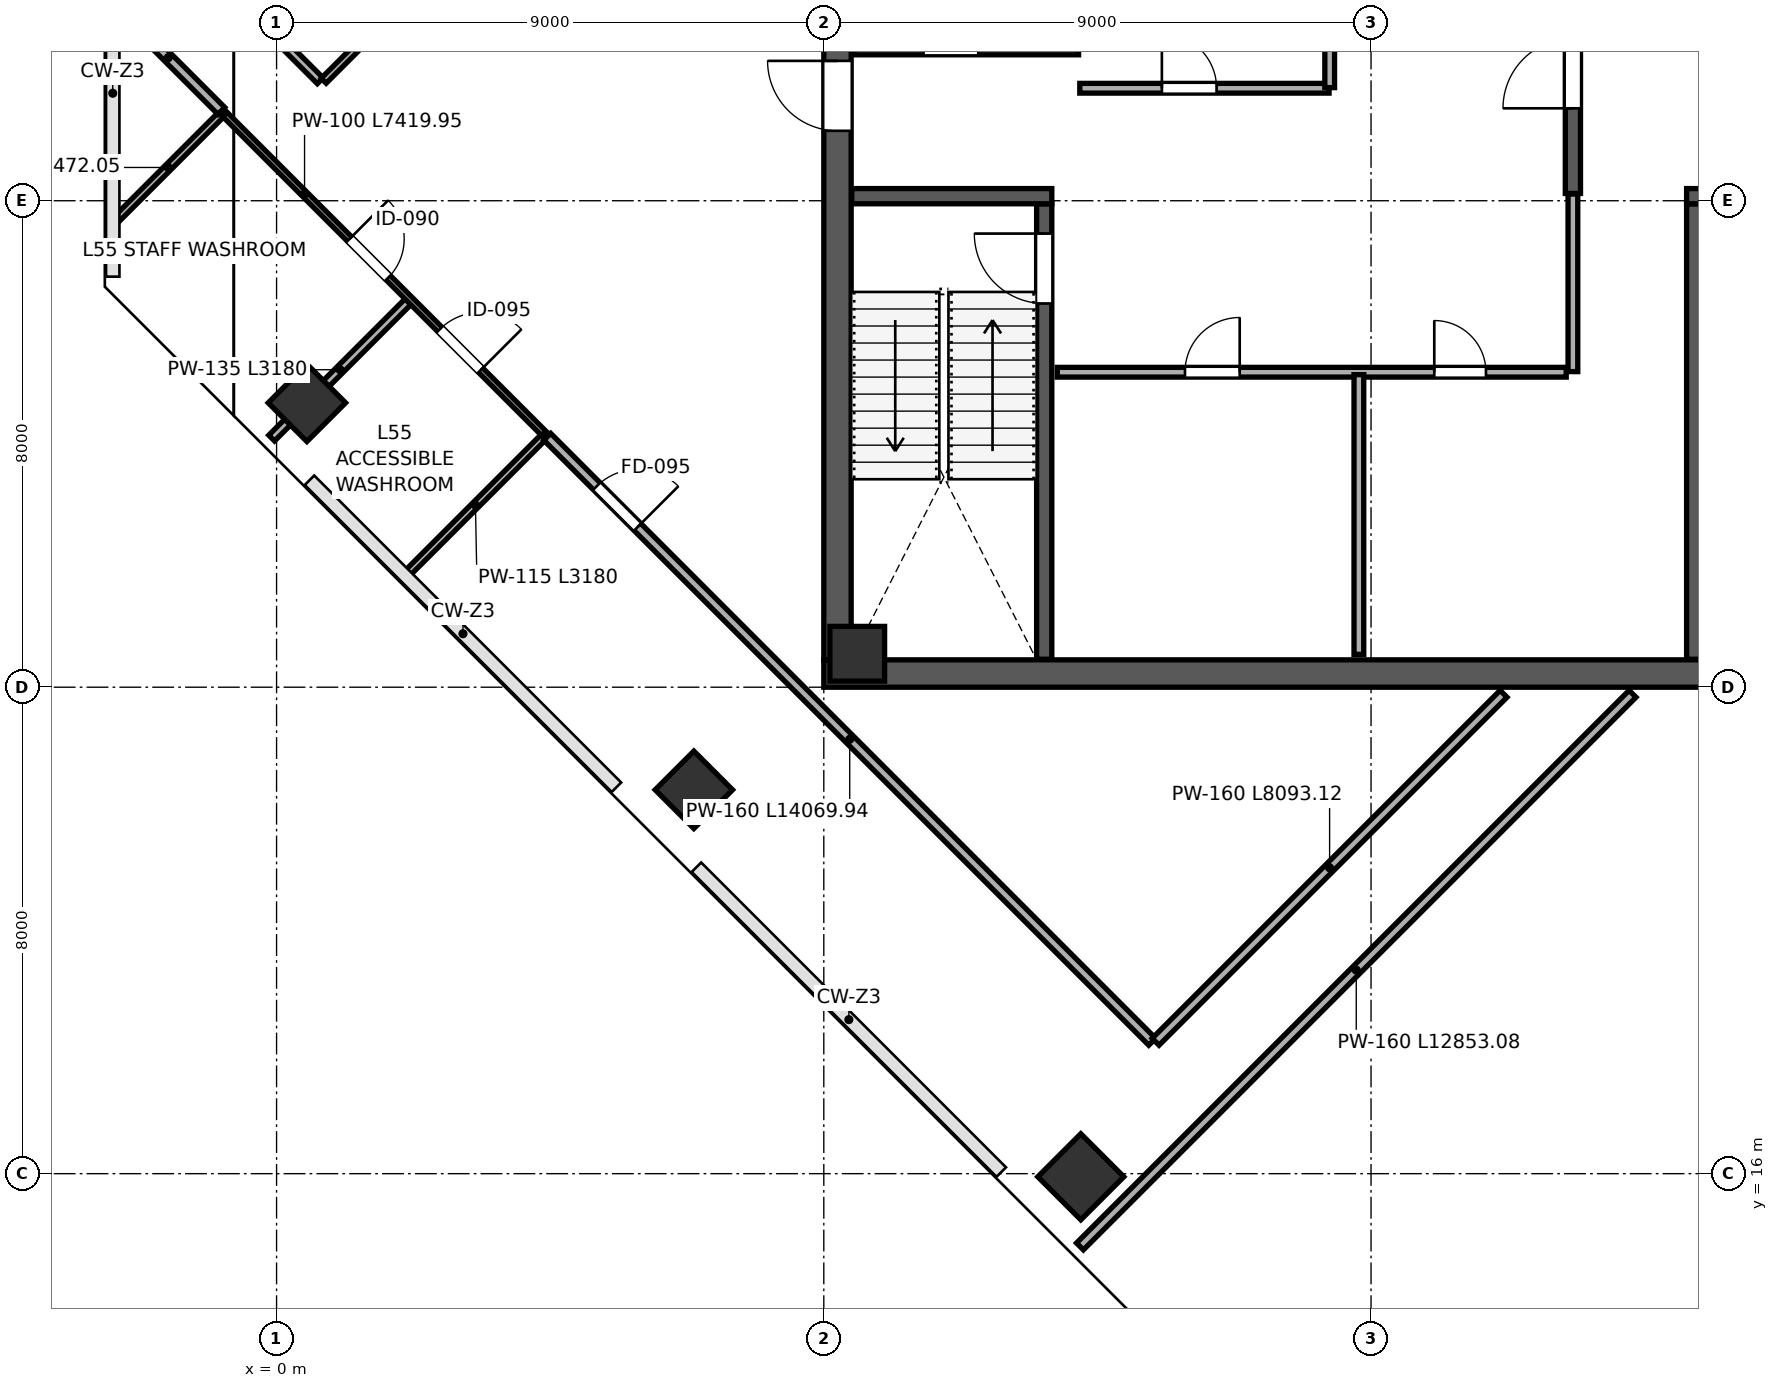
"""IFC4 building model, lengths in metres.
Left out: names, types, materials, properties, quantities, classifications, styles, units other than length and angle.
Written with IfcOpenShell. Run it as: python <this file> out.ifc"""

import sys

from ifc_helpers import new_model, si_unit, direction, frame, frame_2d, origin, origin_2d, place, context, subcontext, project, spatial, rectangle, extrude, source, transform, mapped, element, fill, save


model = new_model("IFC4")
c1 = context("Model", 3, precision=1e-05, world=origin(), true_north=direction((0.0, 1.0)))
c2 = subcontext(c1, "Body", "Model", "MODEL_VIEW")
j1 = project(units=[si_unit("LENGTHUNIT", "METRE"), si_unit("PLANEANGLEUNIT", "RADIAN")], contexts=[c1])
p1 = place(None, origin())
s1 = spatial("IfcSite", under=j1, at=p1, CompositionType="ELEMENT")
p2 = place(p1, origin())
s2 = spatial("IfcBuilding", under=s1, at=p2, CompositionType="ELEMENT")
p3 = place(p2, frame((0.0, 0.0, 245.8)))
s3 = spatial("IfcBuildingStorey", under=s2, at=p3, CompositionType="ELEMENT", Elevation=245.8)
m1 = source(origin(), c2, "Body", "SweptSolid", [
    extrude(rectangle(XDim=0.9, YDim=0.9, at=origin_2d()), origin(), (0.0, 0.0, 1.0), 4.198),
])
p4 = place(p3, frame((9.55, 24.55, 0.001), z_axis=(0.0, 0.0, 1.0), x_axis=(1.0, 0.0, 0.0)))
e1 = element("IfcColumn", 1, at=p4, inside=s3, PredefinedType="COLUMN", context=c2, shape_type="MappedRepresentation", body=[
    mapped(m1, transform((0.0, 0.0, 0.0), scale=1.0)),
])
m2 = source(origin(), c2, "Body", "SweptSolid", [
    extrude(rectangle(XDim=0.9, YDim=0.9, at=origin_2d()), origin(), (0.0, 0.0, 1.0), 4.198),
])
for number, where, z_axis, x_axis in (
    (2, (0.499, 28.677, 0.001), (0.0, 0.0, 1.0), (-0.707, 0.707, 0.0)),
    (3, (6.863, 22.312, 0.001), (0.0, 0.0, 1.0), (-0.707, 0.707, 0.0)),
):
    element("IfcColumn", number, at=place(p3, frame(where, z_axis=z_axis, x_axis=x_axis)), inside=s3, PredefinedType="COLUMN", context=c2, shape_type="MappedRepresentation", body=[
        mapped(m2, transform((0.0, 0.0, 0.0), scale=1.0)),
    ])
m3 = source(origin(), c2, "Body", "SweptSolid", [
    extrude(rectangle(XDim=1.0, YDim=1.0, at=origin_2d()), origin(), (0.0, 0.0, 1.0), 4.198),
])
p5 = place(p3, frame((13.227, 15.949, 0.001), z_axis=(0.0, 0.0, 1.0), x_axis=(-0.707106781187, 0.707106781187, 0.0)))
e4 = element("IfcColumn", 4, at=p5, inside=s3, PredefinedType="COLUMN", context=c2, shape_type="MappedRepresentation", body=[
    mapped(m3, transform((0.0, 0.0, 0.0), scale=1.0)),
])
p6 = place(p3, frame((9.225, 24.45, 0.0), z_axis=(0.0, 0.0, 1.0), x_axis=(0.0, 1.0, 0.0)))
e5 = element("IfcWall", 5, at=p6, inside=s3, PredefinedType="SHEAR", context=c2, shape_type="SweptSolid", body=[
    extrude(rectangle(XDim=15.1, YDim=0.45, at=frame_2d((7.55, 0.0))), origin(), (0.0, 0.0, 1.0), 3.96),
])
p7 = place(p6, frame((8.7, 0.0, 0.0)))
e6 = element("IfcOpeningElement", 6, at=p7, cuts=e5, PredefinedType="OPENING", context=c2, shape_type="SweptSolid", body=[
    extrude(rectangle(XDim=1.15, YDim=2.2, at=frame_2d((0.575, 1.1))), frame((0.0, 0.235, 0.0), z_axis=(0.0, -1.0, 0.0), x_axis=(1.0, 0.0, 0.0)), (0.0, 0.0, 1.0), 0.47),
])
p8 = place(p3, frame((9.0, 24.225, 0.0), z_axis=(0.0, 0.0, 1.0), x_axis=(1.0, 0.0, 0.0)))
e7 = element("IfcWall", 7, at=p8, inside=s3, PredefinedType="SHEAR", context=c2, shape_type="SweptSolid", body=[
    extrude(rectangle(XDim=18.0, YDim=0.45, at=frame_2d((9.0, 0.0))), origin(), (0.0, 0.0, 1.0), 3.96),
])
p9 = place(p3, frame((12.625, 24.46, 0.0), z_axis=(0.0, 0.0, 1.0), x_axis=(0.0, 1.0, 0.0)))
e8 = element("IfcWall", 8, at=p9, inside=s3, PredefinedType="SHEAR", context=c2, shape_type="SweptSolid", body=[
    extrude(rectangle(XDim=7.49, YDim=0.25, at=frame_2d((3.745, 0.0))), origin(), (0.0, 0.0, 1.0), 3.96),
])
p10 = place(p9, frame((5.85, 0.0, 0.0)))
e9 = element("IfcOpeningElement", 9, at=p10, cuts=e8, PredefinedType="OPENING", context=c2, shape_type="SweptSolid", body=[
    extrude(rectangle(XDim=1.15, YDim=2.2, at=frame_2d((0.575, 1.1))), frame((0.0, 0.135, 0.0), z_axis=(0.0, -1.0, 0.0), x_axis=(1.0, 0.0, 0.0)), (0.0, 0.0, 1.0), 0.27),
])
p11 = place(p3, frame((9.46, 32.075, 0.0), z_axis=(0.0, 0.0, 1.0), x_axis=(1.0, 0.0, 0.0)))
e10 = element("IfcWall", 10, at=p11, inside=s3, PredefinedType="SHEAR", context=c2, shape_type="SweptSolid", body=[
    extrude(rectangle(XDim=3.29, YDim=0.25, at=frame_2d((1.645, 0.0))), origin(), (0.0, 0.0, 1.0), 3.96),
])
p12 = place(p3, frame((23.315, 24.46, 0.0), z_axis=(0.0, 0.0, 1.0), x_axis=(0.0, 1.0, 0.0)))
e11 = element("IfcWall", 11, at=p12, inside=s3, PredefinedType="SHEAR", context=c2, shape_type="SweptSolid", body=[
    extrude(rectangle(XDim=7.49, YDim=0.25, at=frame_2d((3.745, 0.0))), origin(), (0.0, 0.0, 1.0), 3.96),
])
p13 = place(p3, frame((23.19, 32.075, 0.0), z_axis=(0.0, 0.0, 1.0), x_axis=(1.0, 0.0, 0.0)))
e12 = element("IfcWall", 12, at=p13, inside=s3, PredefinedType="SHEAR", context=c2, shape_type="SweptSolid", body=[
    extrude(rectangle(XDim=3.35, YDim=0.25, at=frame_2d((1.675, 0.0))), origin(), (0.0, 0.0, 1.0), 3.96),
])
p14 = place(p13, frame((0.85, 0.0, 0.0)))
e13 = element("IfcOpeningElement", 13, at=p14, cuts=e12, PredefinedType="OPENING", context=c2, shape_type="SweptSolid", body=[
    extrude(rectangle(XDim=1.15, YDim=2.2, at=frame_2d((0.575, 1.1))), frame((0.0, 0.135, 0.0), z_axis=(0.0, -1.0, 0.0), x_axis=(1.0, 0.0, 0.0)), (0.0, 0.0, 1.0), 0.27),
])
p15 = place(p3, frame((21.32, 32.12, 0.0), z_axis=(0.0, 0.0, 1.0), x_axis=(0.0, 1.0, 0.0)))
e14 = element("IfcWall", 14, at=p15, inside=s3, PredefinedType="SHEAR", context=c2, shape_type="SweptSolid", body=[
    extrude(rectangle(XDim=7.42, YDim=0.25, at=frame_2d((3.71, 0.0))), origin(), (0.0, 0.0, 1.0), 3.96),
])
p16 = place(p15, frame((1.4, 0.0, 0.0)))
e15 = element("IfcOpeningElement", 15, at=p16, cuts=e14, PredefinedType="OPENING", context=c2, shape_type="SweptSolid", body=[
    extrude(rectangle(XDim=1.15, YDim=2.2, at=frame_2d((0.575, 1.1))), frame((0.0, 0.135, 0.0), z_axis=(0.0, -1.0, 0.0), x_axis=(1.0, 0.0, 0.0)), (0.0, 0.0, 1.0), 0.27),
])
p17 = place(p3, frame((9.49, 34.48, 0.0), z_axis=(0.0, 0.0, 1.0), x_axis=(1.0, 0.0, 0.0)))
e16 = element("IfcWall", 16, at=p17, inside=s3, PredefinedType="PARTITIONING", context=c2, shape_type="SweptSolid", body=[
    extrude(rectangle(XDim=3.7, YDim=0.16, at=frame_2d((1.85, 0.0))), origin(), (0.0, 0.0, 1.0), 3.96),
])
p18 = place(p17, frame((1.15, 0.0, 0.0)))
e17 = element("IfcOpeningElement", 17, at=p18, cuts=e16, PredefinedType="OPENING", context=c2, shape_type="SweptSolid", body=[
    extrude(rectangle(XDim=0.9, YDim=2.15, at=frame_2d((0.45, 1.075))), frame((0.0, 0.09, 0.0), z_axis=(0.0, -1.0, 0.0), x_axis=(1.0, 0.0, 0.0)), (0.0, 0.0, 1.0), 0.18),
])
p19 = place(p3, frame((13.21, 33.85, 0.0), z_axis=(0.0, 0.0, 1.0), x_axis=(1.0, 0.0, 0.0)))
e18 = element("IfcWall", 18, at=p19, inside=s3, PredefinedType="PARTITIONING", context=c2, shape_type="SweptSolid", body=[
    extrude(rectangle(XDim=4.1, YDim=0.16, at=frame_2d((2.05, 0.0))), origin(), (0.0, 0.0, 1.0), 3.96),
])
p20 = place(p19, frame((1.35, 0.0, 0.0)))
e19 = element("IfcOpeningElement", 19, at=p20, cuts=e18, PredefinedType="OPENING", context=c2, shape_type="SweptSolid", body=[
    extrude(rectangle(XDim=0.9, YDim=2.15, at=frame_2d((0.45, 1.075))), frame((0.0, 0.09, 0.0), z_axis=(0.0, -1.0, 0.0), x_axis=(1.0, 0.0, 0.0)), (0.0, 0.0, 1.0), 0.18),
])
p21 = place(p3, frame((17.32, 33.86, 0.0), z_axis=(0.0, 0.0, 1.0), x_axis=(0.0, 1.0, 0.0)))
e20 = element("IfcWall", 20, at=p21, inside=s3, PredefinedType="PARTITIONING", context=c2, shape_type="SweptSolid", body=[
    extrude(rectangle(XDim=1.93, YDim=0.16, at=frame_2d((0.965, 0.0))), origin(), (0.0, 0.0, 1.0), 3.96),
])
p22 = place(p3, frame((12.84, 29.18, 0.0), z_axis=(0.0, 0.0, 1.0), x_axis=(1.0, 0.0, 0.0)))
e21 = element("IfcWall", 21, at=p22, inside=s3, PredefinedType="PARTITIONING", context=c2, shape_type="SweptSolid", body=[
    extrude(rectangle(XDim=8.37, YDim=0.16, at=frame_2d((4.185, 0.0))), origin(), (0.0, 0.0, 1.0), 3.96),
])
p23 = place(p22, frame((2.1, 0.0, 0.0)))
e22 = element("IfcOpeningElement", 22, at=p23, cuts=e21, PredefinedType="OPENING", context=c2, shape_type="SweptSolid", body=[
    extrude(rectangle(XDim=0.9, YDim=2.15, at=frame_2d((0.45, 1.075))), frame((0.0, 0.09, 0.0), z_axis=(0.0, -1.0, 0.0), x_axis=(1.0, 0.0, 0.0)), (0.0, 0.0, 1.0), 0.18),
])
p24 = place(p22, frame((6.2, 0.0, 0.0)))
e23 = element("IfcOpeningElement", 23, at=p24, cuts=e21, PredefinedType="OPENING", context=c2, shape_type="SweptSolid", body=[
    extrude(rectangle(XDim=0.85, YDim=2.1, at=frame_2d((0.425, 1.05))), frame((0.0, 0.09, 0.0), z_axis=(0.0, -1.0, 0.0), x_axis=(1.0, 0.0, 0.0)), (0.0, 0.0, 1.0), 0.18),
])
p25 = place(p3, frame((17.8, 24.54, 0.0), z_axis=(0.0, 0.0, 1.0), x_axis=(0.0, 1.0, 0.0)))
e24 = element("IfcWall", 24, at=p25, inside=s3, PredefinedType="PARTITIONING", context=c2, shape_type="SweptSolid", body=[
    extrude(rectangle(XDim=4.6, YDim=0.16, at=frame_2d((2.3, 0.0))), origin(), (0.0, 0.0, 1.0), 3.96),
])
p26 = place(p3, frame((21.32, 29.19, 0.0), z_axis=(0.0, 0.0, 1.0), x_axis=(0.0, 1.0, 0.0)))
e25 = element("IfcWall", 25, at=p26, inside=s3, PredefinedType="PARTITIONING", context=c2, shape_type="SweptSolid", body=[
    extrude(rectangle(XDim=2.92, YDim=0.16, at=frame_2d((1.46, 0.0))), origin(), (0.0, 0.0, 1.0), 3.96),
])
p27 = place(p3, frame((-2.656, 31.673, 0.0), z_axis=(0.0, 0.0, 1.0), x_axis=(0.707106781187, 0.707106781187, 0.0)))
e26 = element("IfcWall", 26, at=p27, inside=s3, PredefinedType="PARTITIONING", context=c2, shape_type="SweptSolid", body=[
    extrude(rectangle(XDim=2.472, YDim=0.115, at=frame_2d((1.236, 0.0))), origin(), (0.0, 0.0, 1.0), 3.96),
])
p28 = place(p3, frame((-2.656, 35.226, 0.0), z_axis=(0.0, 0.0, 1.0), x_axis=(0.707106781187, -0.707106781187, 0.0)))
e27 = element("IfcWall", 27, at=p28, inside=s3, PredefinedType="PARTITIONING", context=c2, shape_type="SweptSolid", body=[
    extrude(rectangle(XDim=2.472, YDim=0.16, at=frame_2d((1.236, 0.0))), origin(), (0.0, 0.0, 1.0), 3.96),
])
p29 = place(p3, frame((-0.081, 28.097, 0.0), z_axis=(0.0, 0.0, 1.0), x_axis=(0.707068394238, 0.707145166051, 0.0)))
e28 = element("IfcWall", 28, at=p29, inside=s3, PredefinedType="PARTITIONING", context=c2, shape_type="SweptSolid", body=[
    extrude(rectangle(XDim=3.18, YDim=0.135, at=frame_2d((1.59, 0.0))), origin(), (0.0, 0.0, 1.0), 3.195),
])
p30 = place(p3, frame((2.146, 25.869, 0.0), z_axis=(0.0, 0.0, 1.0), x_axis=(0.707106781187, 0.707106781187, 0.0)))
e29 = element("IfcWall", 29, at=p30, inside=s3, PredefinedType="PARTITIONING", context=c2, shape_type="SweptSolid", body=[
    extrude(rectangle(XDim=3.18, YDim=0.115, at=frame_2d((1.59, 0.0))), origin(), (0.0, 0.0, 1.0), 3.195),
])
p31 = place(p3, frame((-0.852, 33.421, 0.0), z_axis=(0.0, 0.0, 1.0), x_axis=(0.707090329382, -0.707123232608, 0.0)))
e30 = element("IfcWall", 30, at=p31, inside=s3, PredefinedType="PARTITIONING", context=c2, shape_type="SweptSolid", body=[
    extrude(rectangle(XDim=7.42, YDim=0.1, at=frame_2d((3.71, 0.0))), origin(), (0.0, 0.0, 1.0), 3.96),
])
p32 = place(p31, frame((2.9, 0.0, 0.0)))
e31 = element("IfcOpeningElement", 31, at=p32, cuts=e30, PredefinedType="OPENING", context=c2, shape_type="SweptSolid", body=[
    extrude(rectangle(XDim=0.9, YDim=2.15, at=frame_2d((0.45, 1.075))), frame((0.0, 0.06, 0.0), z_axis=(0.0, -1.0, 0.0), x_axis=(1.0, 0.0, 0.0)), (0.0, 0.0, 1.0), 0.12),
])
p33 = place(p31, frame((5.0, 0.0, 0.0)))
e32 = element("IfcOpeningElement", 32, at=p33, cuts=e30, PredefinedType="OPENING", context=c2, shape_type="SweptSolid", body=[
    extrude(rectangle(XDim=0.95, YDim=2.15, at=frame_2d((0.475, 1.075))), frame((0.0, 0.06, 0.0), z_axis=(0.0, -1.0, 0.0), x_axis=(1.0, 0.0, 0.0)), (0.0, 0.0, 1.0), 0.12),
])
p34 = place(p3, frame((4.452, 28.118, 0.0), z_axis=(0.0, 0.0, 1.0), x_axis=(0.707106781187, -0.707106781187, 0.0)))
e33 = element("IfcWall", 33, at=p34, inside=s3, PredefinedType="PARTITIONING", context=c2, shape_type="SweptSolid", body=[
    extrude(rectangle(XDim=14.07, YDim=0.16, at=frame_2d((7.035, 0.0))), origin(), (0.0, 0.0, 1.0), 3.96),
])
p35 = place(p34, frame((1.15, 0.0, 0.0)))
e34 = element("IfcOpeningElement", 34, at=p35, cuts=e33, PredefinedType="OPENING", context=c2, shape_type="SweptSolid", body=[
    extrude(rectangle(XDim=0.95, YDim=2.15, at=frame_2d((0.475, 1.075))), frame((0.0, 0.09, 0.0), z_axis=(0.0, -1.0, 0.0), x_axis=(1.0, 0.0, 0.0)), (0.0, 0.0, 1.0), 0.18),
])
p36 = place(p3, frame((14.457, 18.169, 0.0), z_axis=(0.0, 0.0, 1.0), x_axis=(0.707106781187, 0.707106781187, 0.0)))
e35 = element("IfcWall", 35, at=p36, inside=s3, PredefinedType="PARTITIONING", context=c2, shape_type="SweptSolid", body=[
    extrude(rectangle(XDim=8.093, YDim=0.16, at=frame_2d((4.046, 0.0))), origin(), (0.0, 0.0, 1.0), 3.96),
])
p37 = place(p3, frame((-2.414, 37.105, 0.0), z_axis=(0.0, 0.0, 1.0), x_axis=(0.707106781187, -0.707106781187, 0.0)))
e36 = element("IfcWall", 36, at=p37, inside=s3, PredefinedType="PARTITIONING", context=c2, shape_type="SweptSolid", body=[
    extrude(rectangle(XDim=4.43, YDim=0.135, at=frame_2d((2.215, 0.0))), origin(), (0.0, 0.0, 1.0), 3.96),
])
p38 = place(p3, frame((0.775, 33.973, 0.0), z_axis=(0.0, 0.0, 1.0), x_axis=(0.707106781187, 0.707106781187, 0.0)))
e37 = element("IfcWall", 37, at=p38, inside=s3, PredefinedType="PARTITIONING", context=c2, shape_type="SweptSolid", body=[
    extrude(rectangle(XDim=29.28, YDim=0.115, at=frame_2d((14.64, 0.0))), origin(), (0.0, 0.0, 1.0), 3.96),
])
p39 = place(p38, frame((2.6, 0.0, 0.0)))
e38 = element("IfcOpeningElement", 38, at=p39, cuts=e37, PredefinedType="OPENING", context=c2, shape_type="SweptSolid", body=[
    extrude(rectangle(XDim=0.95, YDim=2.15, at=frame_2d((0.475, 1.075))), frame((0.0, 0.067, 0.0), z_axis=(0.0, -1.0, 0.0), x_axis=(1.0, 0.0, 0.0)), (0.0, 0.0, 1.0), 0.135),
])
p40 = place(p3, frame((13.213, 14.803, 0.0), z_axis=(0.0, 0.0, 1.0), x_axis=(0.707116278481, 0.707097283765, 0.0)))
e39 = element("IfcWall", 39, at=p40, inside=s3, PredefinedType="PARTITIONING", context=c2, shape_type="SweptSolid", body=[
    extrude(rectangle(XDim=12.853, YDim=0.16, at=frame_2d((6.427, 0.0))), origin(), (0.0, 0.0, 1.0), 3.96),
])
m4 = source(origin(), c2, "Body", "SweptSolid", [
    extrude(rectangle(XDim=1.15, YDim=2.2, at=frame_2d((0.575, 1.1))), frame((0.0, 0.025, 0.0), z_axis=(0.0, -1.0, 0.0), x_axis=(1.0, 0.0, 0.0)), (0.0, 0.0, 1.0), 0.05),
])
p41 = place(p10, origin())
e40 = element("IfcDoor", 40, at=p41, inside=s3, OperationType="SINGLE_SWING_RIGHT", PredefinedType="DOOR", context=c2, shape_type="MappedRepresentation", body=[
    mapped(m4, transform((0.0, 0.0, 0.0), scale=1.0)),
])
fill(e9, e40)
m5 = source(origin(), c2, "Body", "SweptSolid", [
    extrude(rectangle(XDim=1.15, YDim=2.2, at=frame_2d((0.575, 1.1))), frame((0.0, 0.025, 0.0), z_axis=(0.0, -1.0, 0.0), x_axis=(1.0, 0.0, 0.0)), (0.0, 0.0, 1.0), 0.05),
])
p42 = place(p16, origin())
e41 = element("IfcDoor", 41, at=p42, inside=s3, OperationType="SINGLE_SWING_LEFT", PredefinedType="DOOR", context=c2, shape_type="MappedRepresentation", body=[
    mapped(m5, transform((0.0, 0.0, 0.0), scale=1.0)),
])
fill(e15, e41)
p43 = place(p7, origin())
e42 = element("IfcDoor", 42, at=p43, inside=s3, OperationType="SINGLE_SWING_RIGHT", PredefinedType="DOOR", context=c2, shape_type="MappedRepresentation", body=[
    mapped(m5, transform((0.0, 0.0, 0.0), scale=1.0)),
])
fill(e6, e42)
m6 = source(origin(), c2, "Body", "SweptSolid", [
    extrude(rectangle(XDim=0.9, YDim=2.15, at=frame_2d((0.45, 1.075))), frame((0.0, 0.025, 0.0), z_axis=(0.0, -1.0, 0.0), x_axis=(1.0, 0.0, 0.0)), (0.0, 0.0, 1.0), 0.05),
])
p44 = place(p20, origin())
e43 = element("IfcDoor", 43, at=p44, inside=s3, OperationType="SINGLE_SWING_LEFT", PredefinedType="DOOR", context=c2, shape_type="MappedRepresentation", body=[
    mapped(m6, transform((0.0, 0.0, 0.0), scale=1.0)),
])
fill(e19, e43)
p45 = place(p23, origin())
e44 = element("IfcDoor", 44, at=p45, inside=s3, OperationType="SINGLE_SWING_RIGHT", PredefinedType="DOOR", context=c2, shape_type="MappedRepresentation", body=[
    mapped(m6, transform((0.0, 0.0, 0.0), scale=1.0)),
])
fill(e22, e44)
m7 = source(origin(), c2, "Body", "SweptSolid", [
    extrude(rectangle(XDim=0.85, YDim=2.1, at=frame_2d((0.425, 1.05))), frame((0.0, 0.025, 0.0), z_axis=(0.0, -1.0, 0.0), x_axis=(1.0, 0.0, 0.0)), (0.0, 0.0, 1.0), 0.05),
])
p46 = place(p24, origin())
e45 = element("IfcDoor", 45, at=p46, inside=s3, OperationType="SINGLE_SWING_LEFT", PredefinedType="DOOR", context=c2, shape_type="MappedRepresentation", body=[
    mapped(m7, transform((0.0, 0.0, 0.0), scale=1.0)),
])
fill(e23, e45)
m8 = source(origin(), c2, "Body", "SweptSolid", [
    extrude(rectangle(XDim=0.9, YDim=2.15, at=frame_2d((0.45, 1.075))), frame((0.0, 0.025, 0.0), z_axis=(0.0, -1.0, 0.0), x_axis=(1.0, 0.0, 0.0)), (0.0, 0.0, 1.0), 0.05),
])
p47 = place(p32, origin())
e46 = element("IfcDoor", 46, at=p47, inside=s3, OperationType="SINGLE_SWING_LEFT", PredefinedType="DOOR", context=c2, shape_type="MappedRepresentation", body=[
    mapped(m8, transform((0.0, 0.0, 0.0), scale=1.0)),
])
fill(e31, e46)
m9 = source(origin(), c2, "Body", "SweptSolid", [
    extrude(rectangle(XDim=0.95, YDim=2.15, at=frame_2d((0.475, 1.075))), frame((0.0, 0.025, 0.0), z_axis=(0.0, -1.0, 0.0), x_axis=(1.0, 0.0, 0.0)), (0.0, 0.0, 1.0), 0.05),
])
p48 = place(p33, origin())
e47 = element("IfcDoor", 47, at=p48, inside=s3, OperationType="SINGLE_SWING_RIGHT", PredefinedType="DOOR", context=c2, shape_type="MappedRepresentation", body=[
    mapped(m9, transform((0.0, 0.0, 0.0), scale=1.0)),
])
fill(e32, e47)
m10 = source(origin(), c2, "Body", "SweptSolid", [
    extrude(rectangle(XDim=0.95, YDim=2.15, at=frame_2d((0.475, 1.075))), frame((0.0, 0.025, 0.0), z_axis=(0.0, -1.0, 0.0), x_axis=(1.0, 0.0, 0.0)), (0.0, 0.0, 1.0), 0.05),
])
p49 = place(p35, origin())
e48 = element("IfcDoor", 48, at=p49, inside=s3, OperationType="SINGLE_SWING_RIGHT", PredefinedType="DOOR", context=c2, shape_type="MappedRepresentation", body=[
    mapped(m10, transform((0.0, 0.0, 0.0), scale=1.0)),
])
fill(e34, e48)
save(model, sys.argv[1])
